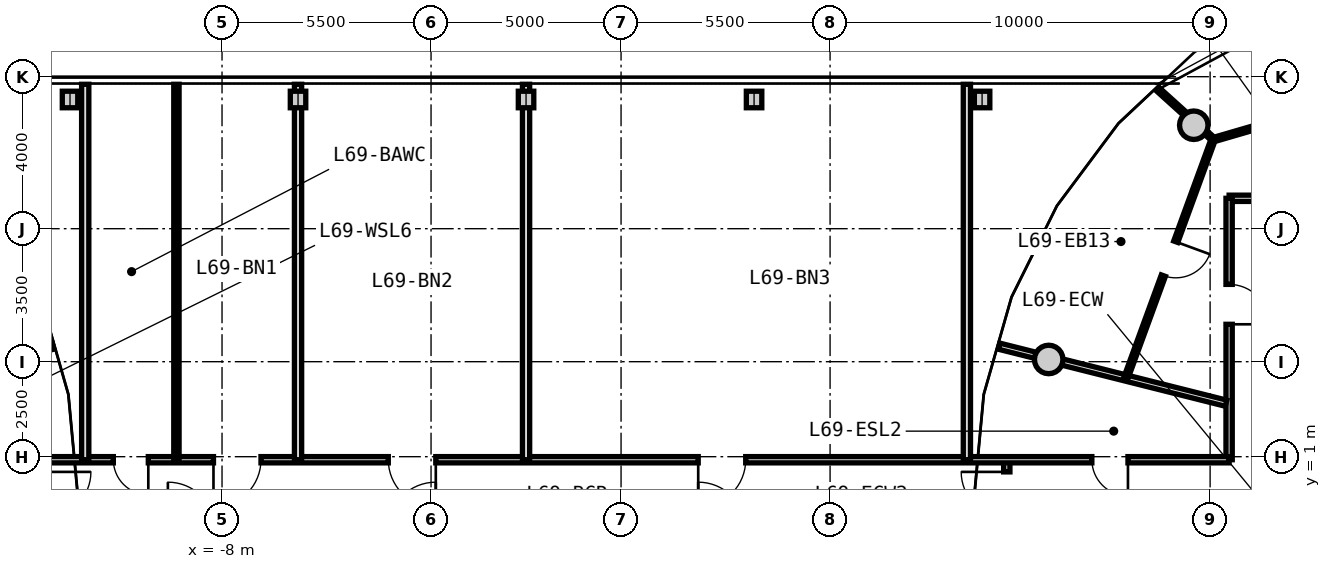
"""IFC4 building model, lengths in metres.
Left out: names, types, materials, properties, quantities, classifications, styles, units other than length and angle.
Written with IfcOpenShell. Run it as: python <this file> out.ifc"""

import sys

from ifc_helpers import new_model, si_unit, direction, frame, frame_2d, origin, origin_2d, place, context, subcontext, project, spatial, rectangle, circle, i_section, extrude, source, transform, mapped, element, fill, save


model = new_model("IFC4")
c1 = context("Model", 3, precision=1e-05, world=origin(), true_north=direction((0.0, 1.0)))
c2 = subcontext(c1, "Body", "Model", "MODEL_VIEW")
j1 = project(units=[si_unit("LENGTHUNIT", "METRE"), si_unit("PLANEANGLEUNIT", "RADIAN")], contexts=[c1])
p1 = place(None, origin())
s1 = spatial("IfcSite", under=j1, at=p1, CompositionType="ELEMENT")
p2 = place(p1, origin())
s2 = spatial("IfcBuilding", under=s1, at=p2, CompositionType="ELEMENT")
p3 = place(p2, frame((0.0, 0.0, 223.05)))
s3 = spatial("IfcBuildingStorey", under=s2, at=p3, CompositionType="ELEMENT", Elevation=223.05)
m1 = source(origin(), c2, "Body", "SweptSolid", [
    extrude(circle(Radius=0.375, at=origin_2d()), origin(), (0.0, 0.0, 1.0), 3.05),
])
for number, where, z_axis, x_axis in (
    (1, (17.57, 9.723, 0.0), (0.0, 0.0, 1.0), (1.0, 0.0, 0.0)),
    (2, (13.753, 3.559, 0.0), (0.0, 0.0, 1.0), (1.0, 0.0, 0.0)),
):
    element("IfcColumn", number, at=place(p3, frame(where, z_axis=z_axis, x_axis=x_axis)), inside=s3, PredefinedType="COLUMN", context=c2, shape_type="MappedRepresentation", body=[
        mapped(m1, transform((0.0, 0.0, 0.0), x_axis=(1.0, 0.0, 0.0), y_axis=(0.0, 1.0, 0.0), z_axis=(0.0, 0.0, 1.0), scale=1.0)),
    ])
m2 = source(origin(), c2, "Body", "SweptSolid", [
    extrude(i_section(OverallWidth=0.407, OverallDepth=0.435, WebThickness=0.024, FlangeThickness=0.039, FilletRadius=0.015, at=origin_2d()), origin(), (0.0, 0.0, 1.0), 3.05),
])
for number, where, z_axis, x_axis in (
    (3, (-12.0, 10.4, 0.0), (0.0, 0.0, 1.0), (1.0, 0.0, 0.0)),
    (4, (-6.0, 10.4, 0.0), (0.0, 0.0, 1.0), (1.0, 0.0, 0.0)),
    (5, (0.0, 10.4, 0.0), (0.0, 0.0, 1.0), (1.0, 0.0, 0.0)),
    (6, (6.0, 10.4, 0.0), (0.0, 0.0, 1.0), (1.0, 0.0, 0.0)),
    (7, (12.0, 10.4, 0.0), (0.0, 0.0, 1.0), (1.0, 0.0, 0.0)),
):
    element("IfcColumn", number, at=place(p3, frame(where, z_axis=z_axis, x_axis=x_axis)), inside=s3, PredefinedType="COLUMN", context=c2, shape_type="MappedRepresentation", body=[
        mapped(m2, transform((0.0, 0.0, 0.0), x_axis=(1.0, 0.0, 0.0), y_axis=(0.0, 1.0, 0.0), z_axis=(0.0, 0.0, 1.0), scale=1.0)),
    ])
m3 = source(origin(), c2, "Body", "SweptSolid", [
    extrude(rectangle(XDim=6.157, YDim=0.165, at=frame_2d((3.079, 0.0))), origin(), (0.0, 0.0, 1.0), 2.345),
])
p4 = place(p3, frame((-18.42, 2.407, 0.0), z_axis=(0.0, 0.0, 1.0), x_axis=(0.969840867184, 0.243738984038, 0.0)))
e8 = element("IfcWall", 8, at=p4, inside=s3, PredefinedType="PARTITIONING", context=c2, shape_type="MappedRepresentation", body=[
    mapped(m3, transform((0.0, 0.0, 0.0), x_axis=(1.0, 0.0, 0.0), y_axis=(0.0, 1.0, 0.0), z_axis=(0.0, 0.0, 1.0), scale=1.0)),
])
m4 = source(origin(), c2, "Body", "SweptSolid", [
    extrude(rectangle(XDim=8.58, YDim=0.165, at=frame_2d((4.29, 0.0))), origin(), (0.0, 0.0, 1.0), 2.745),
])
p5 = place(p3, frame((18.5, 7.8, 0.0), z_axis=(0.0, 0.0, 1.0), x_axis=(1.0, 0.0, 0.0)))
e9 = element("IfcWall", 9, at=p5, inside=s3, PredefinedType="PARTITIONING", context=c2, shape_type="MappedRepresentation", body=[
    mapped(m4, transform((0.0, 0.0, 0.0), x_axis=(1.0, 0.0, 0.0), y_axis=(0.0, 1.0, 0.0), z_axis=(0.0, 0.0, 1.0), scale=1.0)),
])
m5 = source(origin(), c2, "Body", "SweptSolid", [
    extrude(rectangle(XDim=6.88, YDim=0.165, at=frame_2d((3.44, 0.0))), origin(), (0.0, 0.0, 1.0), 2.745),
])
p6 = place(p3, frame((18.5, 0.92, 0.0), z_axis=(0.0, 0.0, 1.0), x_axis=(0.0, 1.0, 0.0)))
e10 = element("IfcWall", 10, at=p6, inside=s3, PredefinedType="PARTITIONING", context=c2, shape_type="MappedRepresentation", body=[
    mapped(m5, transform((0.0, 0.0, 0.0), x_axis=(1.0, 0.0, 0.0), y_axis=(0.0, 1.0, 0.0), z_axis=(0.0, 0.0, 1.0), scale=1.0)),
])
p7 = place(p6, frame((3.564, 0.0, 0.0)))
e11 = element("IfcOpeningElement", 11, at=p7, cuts=e10, PredefinedType="OPENING", context=c2, shape_type="SweptSolid", body=[
    extrude(rectangle(XDim=1.05, YDim=2.15, at=frame_2d((0.525, 1.075))), frame((0.0, 0.093, 0.0), z_axis=(0.0, -1.0, 0.0), x_axis=(1.0, 0.0, 0.0)), (0.0, 0.0, 1.0), 0.185),
])
p8 = place(p3, frame((18.42, 2.407, 0.0), z_axis=(0.0, 0.0, 1.0), x_axis=(-0.969840867184, 0.243738984038, 0.0)))
e12 = element("IfcWall", 12, at=p8, inside=s3, PredefinedType="PARTITIONING", context=c2, shape_type="MappedRepresentation", body=[
    mapped(m3, transform((0.0, 0.0, 0.0), x_axis=(1.0, 0.0, 0.0), y_axis=(0.0, 1.0, 0.0), z_axis=(0.0, 0.0, 1.0), scale=1.0)),
])
m6 = source(origin(), c2, "Body", "SweptSolid", [
    extrude(rectangle(XDim=6.69, YDim=0.115, at=frame_2d((3.345, 0.0))), origin(), (0.0, 0.0, 1.0), 2.745),
])
p9 = place(p3, frame((18.083, 9.352, 0.0), z_axis=(0.0, 0.0, 1.0), x_axis=(-0.343693784919, -0.939081776102, 0.0)))
e13 = element("IfcWall", 13, at=p9, inside=s3, PredefinedType="PARTITIONING", context=c2, shape_type="MappedRepresentation", body=[
    mapped(m6, transform((0.0, 0.0, 0.0), x_axis=(1.0, 0.0, 0.0), y_axis=(0.0, 1.0, 0.0), z_axis=(0.0, 0.0, 1.0), scale=1.0)),
])
p10 = place(p9, frame((2.87, 0.0, 0.0)))
e14 = element("IfcOpeningElement", 14, at=p10, cuts=e13, PredefinedType="OPENING", context=c2, shape_type="SweptSolid", body=[
    extrude(rectangle(XDim=0.95, YDim=2.1, at=frame_2d((0.475, 1.05))), frame((0.0, 0.067, 0.0), z_axis=(0.0, -1.0, 0.0), x_axis=(1.0, 0.0, 0.0)), (0.0, 0.0, 1.0), 0.135),
])
m7 = source(origin(), c2, "Body", "SweptSolid", [
    extrude(rectangle(XDim=1.977, YDim=0.115, at=frame_2d((0.989, 0.0))), origin(), (0.0, 0.0, 1.0), 2.345),
])
p11 = place(p3, frame((18.083, 9.352, 0.0), z_axis=(0.0, 0.0, 1.0), x_axis=(-0.742064998629, 0.670327933037, 0.0)))
e15 = element("IfcWall", 15, at=p11, inside=s3, PredefinedType="PARTITIONING", context=c2, shape_type="MappedRepresentation", body=[
    mapped(m7, transform((0.0, 0.0, 0.0), x_axis=(1.0, 0.0, 0.0), y_axis=(0.0, 1.0, 0.0), z_axis=(0.0, 0.0, 1.0), scale=1.0)),
])
m8 = source(origin(), c2, "Body", "SweptSolid", [
    extrude(rectangle(XDim=3.702, YDim=0.115, at=frame_2d((1.851, 0.0))), origin(), (0.0, 0.0, 1.0), 2.745),
])
p12 = place(p3, frame((21.645, 10.38, 0.0), z_axis=(0.0, 0.0, 1.0), x_axis=(-0.960044309887, -0.279848035645, 0.0)))
e16 = element("IfcWall", 16, at=p12, inside=s3, PredefinedType="PARTITIONING", context=c2, shape_type="MappedRepresentation", body=[
    mapped(m8, transform((0.0, 0.0, 0.0), x_axis=(1.0, 0.0, 0.0), y_axis=(0.0, 1.0, 0.0), z_axis=(0.0, 0.0, 1.0), scale=1.0)),
])
p13 = place(p12, frame((1.376, 0.0, 0.0)))
e17 = element("IfcOpeningElement", 17, at=p13, cuts=e16, PredefinedType="OPENING", context=c2, shape_type="SweptSolid", body=[
    extrude(rectangle(XDim=0.95, YDim=2.1, at=frame_2d((0.475, 1.05))), frame((0.0, 0.067, 0.0), z_axis=(0.0, -1.0, 0.0), x_axis=(1.0, 0.0, 0.0)), (0.0, 0.0, 1.0), 0.135),
])
m9 = source(origin(), c2, "Body", "SweptSolid", [
    extrude(rectangle(XDim=1.84, YDim=0.165, at=frame_2d((0.92, 0.0))), origin(), (0.0, 0.0, 1.0), 2.745),
])
p14 = place(p3, frame((12.65, -0.92, 0.0), z_axis=(0.0, 0.0, 1.0), x_axis=(0.0, 1.0, 0.0)))
e18 = element("IfcWall", 18, at=p14, inside=s3, PredefinedType="PARTITIONING", context=c2, shape_type="MappedRepresentation", body=[
    mapped(m9, transform((0.0, 0.0, 0.0), x_axis=(1.0, 0.0, 0.0), y_axis=(0.0, 1.0, 0.0), z_axis=(0.0, 0.0, 1.0), scale=1.0)),
])
p15 = place(p14, frame((0.32, 0.0, 0.0)))
e19 = element("IfcOpeningElement", 19, at=p15, cuts=e18, PredefinedType="OPENING", context=c2, shape_type="SweptSolid", body=[
    extrude(rectangle(XDim=1.2, YDim=2.15, at=frame_2d((0.6, 1.075))), frame((0.0, 0.093, 0.0), z_axis=(0.0, -1.0, 0.0), x_axis=(1.0, 0.0, 0.0)), (0.0, 0.0, 1.0), 0.185),
])
m10 = source(origin(), c2, "Body", "SweptSolid", [
    extrude(rectangle(XDim=37.0, YDim=0.165, at=frame_2d((18.5, 0.0))), origin(), (0.0, 0.0, 1.0), 2.745),
])
p16 = place(p3, frame((-18.5, 0.92, 0.0), z_axis=(0.0, 0.0, 1.0), x_axis=(1.0, 0.0, 0.0)))
e20 = element("IfcWall", 20, at=p16, inside=s3, PredefinedType="PARTITIONING", context=c2, shape_type="MappedRepresentation", body=[
    mapped(m10, transform((0.0, 0.0, 0.0), x_axis=(1.0, 0.0, 0.0), y_axis=(0.0, 1.0, 0.0), z_axis=(0.0, 0.0, 1.0), scale=1.0)),
])
p17 = place(p16, frame((2.662, 0.0, 0.0)))
e21 = element("IfcOpeningElement", 21, at=p17, cuts=e20, PredefinedType="OPENING", context=c2, shape_type="SweptSolid", body=[
    extrude(rectangle(XDim=0.95, YDim=2.1, at=frame_2d((0.475, 1.05))), frame((0.0, 0.093, 0.0), z_axis=(0.0, -1.0, 0.0), x_axis=(1.0, 0.0, 0.0)), (0.0, 0.0, 1.0), 0.185),
])
p18 = place(p16, frame((33.388, 0.0, 0.0)))
e22 = element("IfcOpeningElement", 22, at=p18, cuts=e20, PredefinedType="OPENING", context=c2, shape_type="SweptSolid", body=[
    extrude(rectangle(XDim=0.95, YDim=2.1, at=frame_2d((0.475, 1.05))), frame((0.0, 0.093, 0.0), z_axis=(0.0, -1.0, 0.0), x_axis=(1.0, 0.0, 0.0)), (0.0, 0.0, 1.0), 0.185),
])
p19 = place(p16, frame((7.64, 0.0, 0.0)))
e23 = element("IfcOpeningElement", 23, at=p19, cuts=e20, PredefinedType="OPENING", context=c2, shape_type="SweptSolid", body=[
    extrude(rectangle(XDim=0.92, YDim=2.1, at=frame_2d((0.46, 1.05))), frame((0.0, 0.093, 0.0), z_axis=(0.0, -1.0, 0.0), x_axis=(1.0, 0.0, 0.0)), (0.0, 0.0, 1.0), 0.185),
])
p20 = place(p16, frame((10.275, 0.0, 0.0)))
e24 = element("IfcOpeningElement", 24, at=p20, cuts=e20, PredefinedType="OPENING", context=c2, shape_type="SweptSolid", body=[
    extrude(rectangle(XDim=1.25, YDim=2.2, at=frame_2d((0.625, 1.1))), frame((0.0, 0.093, 0.0), z_axis=(0.0, -1.0, 0.0), x_axis=(1.0, 0.0, 0.0)), (0.0, 0.0, 1.0), 0.185),
])
p21 = place(p16, frame((14.875, 0.0, 0.0)))
e25 = element("IfcOpeningElement", 25, at=p21, cuts=e20, PredefinedType="OPENING", context=c2, shape_type="SweptSolid", body=[
    extrude(rectangle(XDim=1.25, YDim=2.2, at=frame_2d((0.625, 1.1))), frame((0.0, 0.093, 0.0), z_axis=(0.0, -1.0, 0.0), x_axis=(1.0, 0.0, 0.0)), (0.0, 0.0, 1.0), 0.185),
])
p22 = place(p16, frame((23.03, 0.0, 0.0)))
e26 = element("IfcOpeningElement", 26, at=p22, cuts=e20, PredefinedType="OPENING", context=c2, shape_type="SweptSolid", body=[
    extrude(rectangle(XDim=1.25, YDim=2.2, at=frame_2d((0.625, 1.1))), frame((0.0, 0.093, 0.0), z_axis=(0.0, -1.0, 0.0), x_axis=(1.0, 0.0, 0.0)), (0.0, 0.0, 1.0), 0.185),
])
m11 = source(origin(), c2, "Body", "SweptSolid", [
    extrude(rectangle(XDim=9.88, YDim=0.19, at=frame_2d((4.94, 0.0))), origin(), (0.0, 0.0, 1.0), 2.745),
])
for number, where, z_axis, x_axis in (
    (27, (-11.6, 0.92, 0.0), (0.0, 0.0, 1.0), (0.0, 1.0, 0.0)),
    (28, (11.6, 0.92, 0.0), (0.0, 0.0, 1.0), (0.0, 1.0, 0.0)),
):
    element("IfcWall", number, at=place(p3, frame(where, z_axis=z_axis, x_axis=x_axis)), inside=s3, PredefinedType="PARTITIONING", context=c2, shape_type="MappedRepresentation", body=[
        mapped(m11, transform((0.0, 0.0, 0.0), x_axis=(1.0, 0.0, 0.0), y_axis=(0.0, 1.0, 0.0), z_axis=(0.0, 0.0, 1.0), scale=1.0)),
    ])
m12 = source(origin(), c2, "Body", "SweptSolid", [
    extrude(rectangle(XDim=9.88, YDim=0.19, at=frame_2d((4.94, 0.0))), origin(), (0.0, 0.0, 1.0), 2.045),
])
p23 = place(p3, frame((-6.0, 0.92, 0.0), z_axis=(0.0, 0.0, 1.0), x_axis=(0.0, 1.0, 0.0)))
e29 = element("IfcWall", 29, at=p23, inside=s3, PredefinedType="PARTITIONING", context=c2, shape_type="MappedRepresentation", body=[
    mapped(m12, transform((0.0, 0.0, 0.0), x_axis=(1.0, 0.0, 0.0), y_axis=(0.0, 1.0, 0.0), z_axis=(0.0, 0.0, 1.0), scale=1.0)),
])
m13 = source(origin(), c2, "Body", "SweptSolid", [
    extrude(rectangle(XDim=9.88, YDim=0.14, at=frame_2d((4.94, 0.0))), origin(), (0.0, 0.0, 1.0), 2.745),
])
p24 = place(p3, frame((-9.2, 0.92, 0.0), z_axis=(0.0, 0.0, 1.0), x_axis=(0.0, 1.0, 0.0)))
e30 = element("IfcWall", 30, at=p24, inside=s3, PredefinedType="PARTITIONING", context=c2, shape_type="MappedRepresentation", body=[
    mapped(m13, transform((0.0, 0.0, 0.0), x_axis=(1.0, 0.0, 0.0), y_axis=(0.0, 1.0, 0.0), z_axis=(0.0, 0.0, 1.0), scale=1.0)),
])
p25 = place(p3, frame((0.0, 0.92, 0.0), z_axis=(0.0, 0.0, 1.0), x_axis=(0.0, 1.0, 0.0)))
e31 = element("IfcWall", 31, at=p25, inside=s3, PredefinedType="PARTITIONING", context=c2, shape_type="MappedRepresentation", body=[
    mapped(m12, transform((0.0, 0.0, 0.0), x_axis=(1.0, 0.0, 0.0), y_axis=(0.0, 1.0, 0.0), z_axis=(0.0, 0.0, 1.0), scale=1.0)),
])
m14 = source(origin(), c2, "Body", "SweptSolid", [
    extrude(rectangle(XDim=0.95, YDim=2.1, at=frame_2d((0.475, 1.05))), frame((0.0, 0.025, 0.0), z_axis=(0.0, -1.0, 0.0), x_axis=(1.0, 0.0, 0.0)), (0.0, 0.0, 1.0), 0.05),
])
p26 = place(p18, frame((0.95, 0.0, 0.0), z_axis=(0.0, 0.0, 1.0), x_axis=(-1.0, 0.0, 0.0)))
e32 = element("IfcDoor", 32, at=p26, inside=s3, OperationType="SINGLE_SWING_LEFT", PredefinedType="DOOR", context=c2, shape_type="MappedRepresentation", body=[
    mapped(m14, transform((0.0, 0.0, 0.0), x_axis=(1.0, 0.0, 0.0), y_axis=(0.0, 1.0, 0.0), z_axis=(0.0, 0.0, 1.0), scale=1.0)),
])
fill(e22, e32)
m15 = source(origin(), c2, "Body", "SweptSolid", [
    extrude(rectangle(XDim=1.05, YDim=2.15, at=frame_2d((0.525, 1.075))), frame((0.0, 0.025, 0.0), z_axis=(0.0, -1.0, 0.0), x_axis=(1.0, 0.0, 0.0)), (0.0, 0.0, 1.0), 0.05),
])
p27 = place(p7, frame((1.05, 0.0, 0.0), z_axis=(0.0, 0.0, 1.0), x_axis=(-1.0, 0.0, 0.0)))
e33 = element("IfcDoor", 33, at=p27, inside=s3, OperationType="SINGLE_SWING_RIGHT", PredefinedType="DOOR", context=c2, shape_type="MappedRepresentation", body=[
    mapped(m15, transform((0.0, 0.0, 0.0), x_axis=(1.0, 0.0, 0.0), y_axis=(0.0, 1.0, 0.0), z_axis=(0.0, 0.0, 1.0), scale=1.0)),
])
fill(e11, e33)
p28 = place(p10, origin())
e34 = element("IfcDoor", 34, at=p28, inside=s3, OperationType="SINGLE_SWING_LEFT", PredefinedType="DOOR", context=c2, shape_type="MappedRepresentation", body=[
    mapped(m14, transform((0.0, 0.0, 0.0), x_axis=(1.0, 0.0, 0.0), y_axis=(0.0, 1.0, 0.0), z_axis=(0.0, 0.0, 1.0), scale=1.0)),
])
fill(e14, e34)
m16 = source(origin(), c2, "Body", "SweptSolid", [
    extrude(rectangle(XDim=1.2, YDim=2.15, at=frame_2d((0.6, 1.075))), frame((0.0, 0.025, 0.0), z_axis=(0.0, -1.0, 0.0), x_axis=(1.0, 0.0, 0.0)), (0.0, 0.0, 1.0), 0.05),
])
p29 = place(p15, origin())
e35 = element("IfcDoor", 35, at=p29, inside=s3, OperationType="SINGLE_SWING_RIGHT", PredefinedType="DOOR", context=c2, shape_type="MappedRepresentation", body=[
    mapped(m16, transform((0.0, 0.0, 0.0), x_axis=(1.0, 0.0, 0.0), y_axis=(0.0, 1.0, 0.0), z_axis=(0.0, 0.0, 1.0), scale=1.0)),
])
fill(e19, e35)
m17 = source(origin(), c2, "Body", "SweptSolid", [
    extrude(rectangle(XDim=0.92, YDim=2.1, at=frame_2d((0.46, 1.05))), frame((0.0, 0.025, 0.0), z_axis=(0.0, -1.0, 0.0), x_axis=(1.0, 0.0, 0.0)), (0.0, 0.0, 1.0), 0.05),
])
p30 = place(p19, frame((0.92, 0.0, 0.0), z_axis=(0.0, 0.0, 1.0), x_axis=(-1.0, 0.0, 0.0)))
e36 = element("IfcDoor", 36, at=p30, inside=s3, OperationType="SINGLE_SWING_LEFT", PredefinedType="DOOR", context=c2, shape_type="MappedRepresentation", body=[
    mapped(m17, transform((0.0, 0.0, 0.0), x_axis=(1.0, 0.0, 0.0), y_axis=(0.0, 1.0, 0.0), z_axis=(0.0, 0.0, 1.0), scale=1.0)),
])
fill(e23, e36)
m18 = source(origin(), c2, "Body", "SweptSolid", [
    extrude(rectangle(XDim=1.25, YDim=2.2, at=frame_2d((0.625, 1.1))), frame((0.0, 0.025, 0.0), z_axis=(0.0, -1.0, 0.0), x_axis=(1.0, 0.0, 0.0)), (0.0, 0.0, 1.0), 0.05),
])
p31 = place(p20, frame((1.25, 0.0, 0.0), z_axis=(0.0, 0.0, 1.0), x_axis=(-1.0, 0.0, 0.0)))
e37 = element("IfcDoor", 37, at=p31, inside=s3, OperationType="SINGLE_SWING_RIGHT", PredefinedType="DOOR", context=c2, shape_type="MappedRepresentation", body=[
    mapped(m18, transform((0.0, 0.0, 0.0), x_axis=(1.0, 0.0, 0.0), y_axis=(0.0, 1.0, 0.0), z_axis=(0.0, 0.0, 1.0), scale=1.0)),
])
fill(e24, e37)
p32 = place(p21, frame((1.25, 0.0, 0.0), z_axis=(0.0, 0.0, 1.0), x_axis=(-1.0, 0.0, 0.0)))
e38 = element("IfcDoor", 38, at=p32, inside=s3, OperationType="SINGLE_SWING_LEFT", PredefinedType="DOOR", context=c2, shape_type="MappedRepresentation", body=[
    mapped(m18, transform((0.0, 0.0, 0.0), x_axis=(1.0, 0.0, 0.0), y_axis=(0.0, 1.0, 0.0), z_axis=(0.0, 0.0, 1.0), scale=1.0)),
])
fill(e25, e38)
p33 = place(p22, frame((1.25, 0.0, 0.0), z_axis=(0.0, 0.0, 1.0), x_axis=(-1.0, 0.0, 0.0)))
e39 = element("IfcDoor", 39, at=p33, inside=s3, OperationType="SINGLE_SWING_RIGHT", PredefinedType="DOOR", context=c2, shape_type="MappedRepresentation", body=[
    mapped(m18, transform((0.0, 0.0, 0.0), x_axis=(1.0, 0.0, 0.0), y_axis=(0.0, 1.0, 0.0), z_axis=(0.0, 0.0, 1.0), scale=1.0)),
])
fill(e26, e39)
save(model, sys.argv[1])
